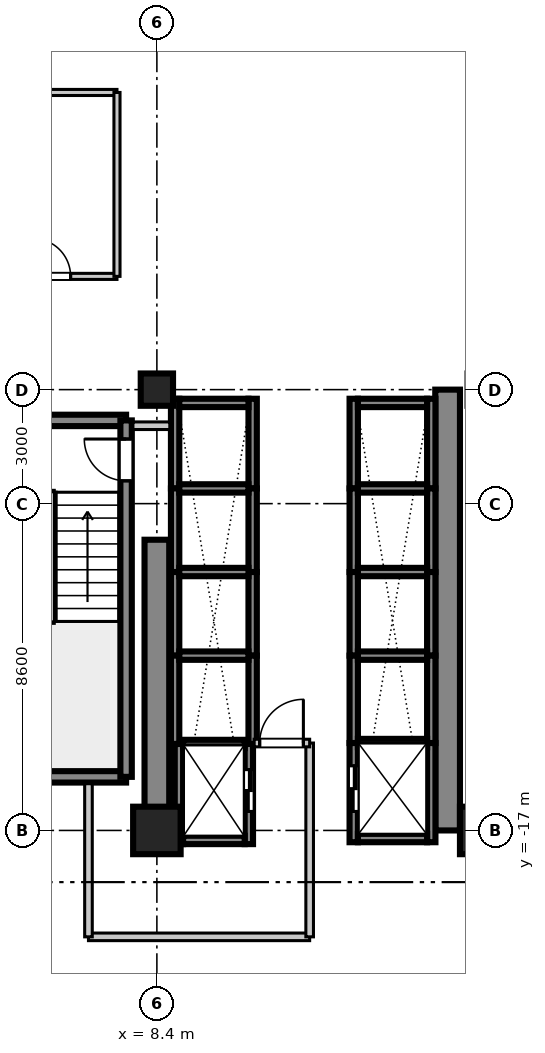
"""IFC4 building model, lengths in metres.
Left out: names, types, materials, properties, quantities, classifications, styles, units other than length and angle.
Written with IfcOpenShell. Run it as: python <this file> out.ifc"""

import sys

from ifc_helpers import new_model, si_unit, direction, frame, frame_2d, origin, origin_2d, place, context, subcontext, project, spatial, rectangle, extrude, source, transform, mapped, element, fill, save


model = new_model("IFC4")
c1 = context("Model", 3, precision=1e-05, world=origin(), true_north=direction((0.0, 1.0)))
c2 = subcontext(c1, "Body", "Model", "MODEL_VIEW")
j1 = project(units=[si_unit("LENGTHUNIT", "METRE"), si_unit("PLANEANGLEUNIT", "RADIAN")], contexts=[c1])
p1 = place(None, origin())
s1 = spatial("IfcSite", under=j1, at=p1, CompositionType="ELEMENT")
p2 = place(p1, origin())
s2 = spatial("IfcBuilding", under=s1, at=p2, CompositionType="ELEMENT")
p3 = place(p2, frame((0.0, 0.0, 124.8)))
s3 = spatial("IfcBuildingStorey", under=s2, at=p3, CompositionType="ELEMENT", Elevation=124.8)
m1 = source(origin(), c2, "Body", "SweptSolid", [
    extrude(rectangle(XDim=1.25, YDim=1.25, at=origin_2d()), origin(), (0.0, 0.0, 1.0), 3.605),
])
p4 = place(p3, frame((8.4, -17.0, 0.0), z_axis=(0.0, 0.0, 1.0), x_axis=(1.0, 0.0, 0.0)))
e1 = element("IfcColumn", 1, at=p4, inside=s3, PredefinedType="COLUMN", context=c2, shape_type="MappedRepresentation", body=[
    mapped(m1, transform((0.0, 0.0, 0.0), scale=1.0)),
])
m2 = source(origin(), c2, "Body", "SweptSolid", [
    extrude(rectangle(XDim=0.85, YDim=0.85, at=origin_2d()), origin(), (0.0, 0.0, 1.0), 3.605),
])
p5 = place(p3, frame((8.4, -5.4, 0.0), z_axis=(0.0, 0.0, 1.0), x_axis=(1.0, 0.0, 0.0)))
e2 = element("IfcColumn", 2, at=p5, inside=s3, PredefinedType="PILASTER", context=c2, shape_type="MappedRepresentation", body=[
    mapped(m2, transform((0.0, 0.0, 0.0), scale=1.0)),
])
p6 = place(p3, frame((17.0, -17.0, 0.0), z_axis=(0.0, 0.0, 1.0), x_axis=(1.0, 0.0, 0.0)))
e3 = element("IfcColumn", 3, at=p6, inside=s3, PredefinedType="COLUMN", context=c2, shape_type="MappedRepresentation", body=[
    mapped(m1, transform((0.0, 0.0, 0.0), scale=1.0)),
])
m3 = source(origin(), c2, "Body", "SweptSolid", [
    extrude(rectangle(XDim=7.65, YDim=0.65, at=frame_2d((3.825, 0.0))), origin(), (0.0, 0.0, 1.0), 3.38),
])
p7 = place(p3, frame((8.4, -17.0, 0.0), z_axis=(0.0, 0.0, 1.0), x_axis=(0.0, 1.0, 0.0)))
e4 = element("IfcWall", 4, at=p7, inside=s3, PredefinedType="SHEAR", context=c2, shape_type="MappedRepresentation", body=[
    mapped(m3, transform((0.0, 0.0, 0.0), scale=1.0)),
])
m4 = source(origin(), c2, "Body", "SweptSolid", [
    extrude(rectangle(XDim=11.6, YDim=0.65, at=frame_2d((5.8, 0.0))), origin(), (0.0, 0.0, 1.0), 3.38),
])
p8 = place(p3, frame((16.05, -17.0, 0.0), z_axis=(0.0, 0.0, 1.0), x_axis=(0.0, 1.0, 0.0)))
e5 = element("IfcWall", 5, at=p8, inside=s3, PredefinedType="SHEAR", context=c2, shape_type="MappedRepresentation", body=[
    mapped(m4, transform((0.0, 0.0, 0.0), scale=1.0)),
])
m5 = source(origin(), c2, "Body", "SweptSolid", [
    extrude(rectangle(XDim=3.98, YDim=0.3, at=frame_2d((1.99, 0.0))), origin(), (0.0, 0.0, 1.0), 3.38),
])
for number, where, z_axis, x_axis in (
    (6, (3.61, -15.59, 0.0), (0.0, 0.0, 1.0), (1.0, 0.0, 0.0)),
    (7, (3.61, -6.21, 0.0), (0.0, 0.0, 1.0), (1.0, 0.0, 0.0)),
):
    element("IfcWall", number, at=place(p3, frame(where, z_axis=z_axis, x_axis=x_axis)), inside=s3, PredefinedType="SHEAR", context=c2, shape_type="MappedRepresentation", body=[
        mapped(m5, transform((0.0, 0.0, 0.0), scale=1.0)),
    ])
m6 = source(origin(), c2, "Body", "SweptSolid", [
    extrude(rectangle(XDim=9.38, YDim=0.3, at=frame_2d((4.69, 0.0))), origin(), (0.0, 0.0, 1.0), 3.38),
])
p9 = place(p3, frame((7.59, -15.59, 0.0), z_axis=(0.0, 0.0, 1.0), x_axis=(0.0, 1.0, 0.0)))
e8 = element("IfcWall", 8, at=p9, inside=s3, PredefinedType="SHEAR", context=c2, shape_type="MappedRepresentation", body=[
    mapped(m6, transform((0.0, 0.0, 0.0), scale=1.0)),
])
p10 = place(p9, frame((7.79, 0.0, 0.0)))
e9 = element("IfcOpeningElement", 9, at=p10, cuts=e8, PredefinedType="OPENING", context=c2, shape_type="SweptSolid", body=[
    extrude(rectangle(XDim=1.1, YDim=2.15, at=frame_2d((0.55, 1.075))), frame((0.0, 0.16, 0.0), z_axis=(0.0, -1.0, 0.0), x_axis=(1.0, 0.0, 0.0)), (0.0, 0.0, 1.0), 0.32),
])
m7 = source(origin(), c2, "Body", "SweptSolid", [
    extrude(rectangle(XDim=2.36, YDim=0.22, at=frame_2d((1.18, 0.0))), origin(), (0.0, 0.0, 1.0), 3.38),
])
for number, where, z_axis, x_axis in (
    (10, (13.58, -8.0, 0.0), (0.0, 0.0, 1.0), (0.0, 1.0, 0.0)),
    (11, (15.62, -8.0, 0.0), (0.0, 0.0, 1.0), (0.0, 1.0, 0.0)),
):
    element("IfcWall", number, at=place(p3, frame(where, z_axis=z_axis, x_axis=x_axis)), inside=s3, PredefinedType="SHEAR", context=c2, shape_type="MappedRepresentation", body=[
        mapped(m7, transform((0.0, 0.0, 0.0), scale=1.0)),
    ])
m8 = source(origin(), c2, "Body", "SweptSolid", [
    extrude(rectangle(XDim=1.82, YDim=0.22, at=frame_2d((0.91, 0.0))), origin(), (0.0, 0.0, 1.0), 3.38),
])
p11 = place(p3, frame((13.69, -5.75, 0.0), z_axis=(0.0, 0.0, 1.0), x_axis=(1.0, 0.0, 0.0)))
e12 = element("IfcWall", 12, at=p11, inside=s3, PredefinedType="SHEAR", context=c2, shape_type="MappedRepresentation", body=[
    mapped(m8, transform((0.0, 0.0, 0.0), scale=1.0)),
])
m9 = source(origin(), c2, "Body", "SweptSolid", [
    extrude(rectangle(XDim=2.2, YDim=0.22, at=frame_2d((1.1, 0.0))), origin(), (0.0, 0.0, 1.0), 3.38),
])
for number, where, z_axis, x_axis in (
    (13, (13.58, -10.2, 0.0), (0.0, 0.0, 1.0), (0.0, 1.0, 0.0)),
    (14, (15.62, -10.2, 0.0), (0.0, 0.0, 1.0), (0.0, 1.0, 0.0)),
):
    element("IfcWall", number, at=place(p3, frame(where, z_axis=z_axis, x_axis=x_axis)), inside=s3, PredefinedType="SHEAR", context=c2, shape_type="MappedRepresentation", body=[
        mapped(m9, transform((0.0, 0.0, 0.0), scale=1.0)),
    ])
m10 = source(origin(), c2, "Body", "SweptSolid", [
    extrude(rectangle(XDim=1.82, YDim=0.22, at=frame_2d((0.91, 0.0))), origin(), (0.0, 0.0, 1.0), 3.65),
])
p12 = place(p3, frame((13.69, -8.0, 0.0), z_axis=(0.0, 0.0, 1.0), x_axis=(1.0, 0.0, 0.0)))
e15 = element("IfcWall", 15, at=p12, inside=s3, PredefinedType="SHEAR", context=c2, shape_type="MappedRepresentation", body=[
    mapped(m10, transform((0.0, 0.0, 0.0), scale=1.0)),
])
for number, where, z_axis, x_axis in (
    (16, (13.58, -12.4, 0.0), (0.0, 0.0, 1.0), (0.0, 1.0, 0.0)),
    (17, (15.62, -12.4, 0.0), (0.0, 0.0, 1.0), (0.0, 1.0, 0.0)),
):
    element("IfcWall", number, at=place(p3, frame(where, z_axis=z_axis, x_axis=x_axis)), inside=s3, PredefinedType="SHEAR", context=c2, shape_type="MappedRepresentation", body=[
        mapped(m9, transform((0.0, 0.0, 0.0), scale=1.0)),
    ])
p13 = place(p3, frame((13.69, -10.2, 0.0), z_axis=(0.0, 0.0, 1.0), x_axis=(1.0, 0.0, 0.0)))
e18 = element("IfcWall", 18, at=p13, inside=s3, PredefinedType="SHEAR", context=c2, shape_type="MappedRepresentation", body=[
    mapped(m10, transform((0.0, 0.0, 0.0), scale=1.0)),
])
m11 = source(origin(), c2, "Body", "SweptSolid", [
    extrude(rectangle(XDim=2.3, YDim=0.22, at=frame_2d((1.15, 0.0))), origin(), (0.0, 0.0, 1.0), 3.38),
])
for number, where, z_axis, x_axis in (
    (19, (13.58, -14.7, 0.0), (0.0, 0.0, 1.0), (0.0, 1.0, 0.0)),
    (20, (15.62, -14.7, 0.0), (0.0, 0.0, 1.0), (0.0, 1.0, 0.0)),
):
    element("IfcWall", number, at=place(p3, frame(where, z_axis=z_axis, x_axis=x_axis)), inside=s3, PredefinedType="SHEAR", context=c2, shape_type="MappedRepresentation", body=[
        mapped(m11, transform((0.0, 0.0, 0.0), scale=1.0)),
    ])
p14 = place(p3, frame((13.69, -12.4, 0.0), z_axis=(0.0, 0.0, 1.0), x_axis=(1.0, 0.0, 0.0)))
e21 = element("IfcWall", 21, at=p14, inside=s3, PredefinedType="SHEAR", context=c2, shape_type="MappedRepresentation", body=[
    mapped(m10, transform((0.0, 0.0, 0.0), scale=1.0)),
])
for number, where, z_axis, x_axis in (
    (22, (8.88, -8.0, 0.0), (0.0, 0.0, 1.0), (0.0, 1.0, 0.0)),
    (23, (10.92, -8.0, 0.0), (0.0, 0.0, 1.0), (0.0, 1.0, 0.0)),
):
    element("IfcWall", number, at=place(p3, frame(where, z_axis=z_axis, x_axis=x_axis)), inside=s3, PredefinedType="SHEAR", context=c2, shape_type="MappedRepresentation", body=[
        mapped(m7, transform((0.0, 0.0, 0.0), scale=1.0)),
    ])
p15 = place(p3, frame((8.99, -5.75, 0.0), z_axis=(0.0, 0.0, 1.0), x_axis=(1.0, 0.0, 0.0)))
e24 = element("IfcWall", 24, at=p15, inside=s3, PredefinedType="SHEAR", context=c2, shape_type="MappedRepresentation", body=[
    mapped(m8, transform((0.0, 0.0, 0.0), scale=1.0)),
])
for number, where, z_axis, x_axis in (
    (25, (8.88, -10.2, 0.0), (0.0, 0.0, 1.0), (0.0, 1.0, 0.0)),
    (26, (10.92, -10.2, 0.0), (0.0, 0.0, 1.0), (0.0, 1.0, 0.0)),
):
    element("IfcWall", number, at=place(p3, frame(where, z_axis=z_axis, x_axis=x_axis)), inside=s3, PredefinedType="SHEAR", context=c2, shape_type="MappedRepresentation", body=[
        mapped(m9, transform((0.0, 0.0, 0.0), scale=1.0)),
    ])
p16 = place(p3, frame((8.99, -8.0, 0.0), z_axis=(0.0, 0.0, 1.0), x_axis=(1.0, 0.0, 0.0)))
e27 = element("IfcWall", 27, at=p16, inside=s3, PredefinedType="SHEAR", context=c2, shape_type="MappedRepresentation", body=[
    mapped(m10, transform((0.0, 0.0, 0.0), scale=1.0)),
])
for number, where, z_axis, x_axis in (
    (28, (8.88, -12.4, 0.0), (0.0, 0.0, 1.0), (0.0, 1.0, 0.0)),
    (29, (10.92, -12.4, 0.0), (0.0, 0.0, 1.0), (0.0, 1.0, 0.0)),
):
    element("IfcWall", number, at=place(p3, frame(where, z_axis=z_axis, x_axis=x_axis)), inside=s3, PredefinedType="SHEAR", context=c2, shape_type="MappedRepresentation", body=[
        mapped(m9, transform((0.0, 0.0, 0.0), scale=1.0)),
    ])
p17 = place(p3, frame((8.99, -10.2, 0.0), z_axis=(0.0, 0.0, 1.0), x_axis=(1.0, 0.0, 0.0)))
e30 = element("IfcWall", 30, at=p17, inside=s3, PredefinedType="SHEAR", context=c2, shape_type="MappedRepresentation", body=[
    mapped(m10, transform((0.0, 0.0, 0.0), scale=1.0)),
])
m12 = source(origin(), c2, "Body", "SweptSolid", [
    extrude(rectangle(XDim=2.325, YDim=0.22, at=frame_2d((1.163, 0.0))), origin(), (0.0, 0.0, 1.0), 3.38),
])
for number, where, z_axis, x_axis in (
    (31, (8.88, -14.725, 0.0), (0.0, 0.0, 1.0), (0.0, 1.0, 0.0)),
    (32, (10.92, -14.725, 0.0), (0.0, 0.0, 1.0), (0.0, 1.0, 0.0)),
):
    element("IfcWall", number, at=place(p3, frame(where, z_axis=z_axis, x_axis=x_axis)), inside=s3, PredefinedType="SHEAR", context=c2, shape_type="MappedRepresentation", body=[
        mapped(m12, transform((0.0, 0.0, 0.0), scale=1.0)),
    ])
p18 = place(p3, frame((8.99, -12.4, 0.0), z_axis=(0.0, 0.0, 1.0), x_axis=(1.0, 0.0, 0.0)))
e33 = element("IfcWall", 33, at=p18, inside=s3, PredefinedType="SHEAR", context=c2, shape_type="MappedRepresentation", body=[
    mapped(m10, transform((0.0, 0.0, 0.0), scale=1.0)),
])
m13 = source(origin(), c2, "Body", "SweptSolid", [
    extrude(rectangle(XDim=2.635, YDim=0.22, at=frame_2d((1.317, 0.0))), origin(), (0.0, 0.0, 1.0), 3.38),
])
p19 = place(p3, frame((8.98, -17.36, 0.0), z_axis=(0.0, 0.0, 1.0), x_axis=(0.0, 1.0, 0.0)))
e34 = element("IfcWall", 34, at=p19, inside=s3, PredefinedType="SHEAR", context=c2, shape_type="MappedRepresentation", body=[
    mapped(m13, transform((0.0, 0.0, 0.0), scale=1.0)),
])
p20 = place(p3, frame((10.82, -17.36, 0.0), z_axis=(0.0, 0.0, 1.0), x_axis=(0.0, 1.0, 0.0)))
e35 = element("IfcWall", 35, at=p20, inside=s3, PredefinedType="SHEAR", context=c2, shape_type="MappedRepresentation", body=[
    mapped(m13, transform((0.0, 0.0, 0.0), scale=1.0)),
])
p21 = place(p20, frame((0.86, 0.0, 0.0)))
e36 = element("IfcOpeningElement", 36, at=p21, cuts=e35, PredefinedType="OPENING", context=c2, shape_type="SweptSolid", body=[
    extrude(rectangle(XDim=1.1, YDim=2.2, at=frame_2d((0.55, 1.1))), frame((0.0, 0.12, 0.0), z_axis=(0.0, -1.0, 0.0), x_axis=(1.0, 0.0, 0.0)), (0.0, 0.0, 1.0), 0.24),
])
m14 = source(origin(), c2, "Body", "SweptSolid", [
    extrude(rectangle(XDim=1.62, YDim=0.22, at=frame_2d((0.81, 0.0))), origin(), (0.0, 0.0, 1.0), 3.38),
])
p22 = place(p3, frame((9.09, -17.25, 0.0), z_axis=(0.0, 0.0, 1.0), x_axis=(1.0, 0.0, 0.0)))
e37 = element("IfcWall", 37, at=p22, inside=s3, PredefinedType="SHEAR", context=c2, shape_type="MappedRepresentation", body=[
    mapped(m14, transform((0.0, 0.0, 0.0), scale=1.0)),
])
m15 = source(origin(), c2, "Body", "SweptSolid", [
    extrude(rectangle(XDim=1.62, YDim=0.22, at=frame_2d((0.81, 0.0))), origin(), (0.0, 0.0, 1.0), 3.65),
])
p23 = place(p3, frame((9.09, -14.725, 0.0), z_axis=(0.0, 0.0, 1.0), x_axis=(1.0, 0.0, 0.0)))
e38 = element("IfcWall", 38, at=p23, inside=s3, PredefinedType="SHEAR", context=c2, shape_type="MappedRepresentation", body=[
    mapped(m15, transform((0.0, 0.0, 0.0), scale=1.0)),
])
m16 = source(origin(), c2, "Body", "SweptSolid", [
    extrude(rectangle(XDim=2.61, YDim=0.22, at=frame_2d((1.305, 0.0))), origin(), (0.0, 0.0, 1.0), 3.38),
])
p24 = place(p3, frame((13.58, -17.31, 0.0), z_axis=(0.0, 0.0, 1.0), x_axis=(0.0, 1.0, 0.0)))
e39 = element("IfcWall", 39, at=p24, inside=s3, PredefinedType="SHEAR", context=c2, shape_type="MappedRepresentation", body=[
    mapped(m16, transform((0.0, 0.0, 0.0), scale=1.0)),
])
p25 = place(p24, frame((0.81, 0.0, 0.0)))
e40 = element("IfcOpeningElement", 40, at=p25, cuts=e39, PredefinedType="OPENING", context=c2, shape_type="SweptSolid", body=[
    extrude(rectangle(XDim=1.2, YDim=2.2, at=frame_2d((0.6, 1.1))), frame((0.0, 0.12, 0.0), z_axis=(0.0, -1.0, 0.0), x_axis=(1.0, 0.0, 0.0)), (0.0, 0.0, 1.0), 0.24),
])
p26 = place(p3, frame((15.62, -17.31, 0.0), z_axis=(0.0, 0.0, 1.0), x_axis=(0.0, 1.0, 0.0)))
e41 = element("IfcWall", 41, at=p26, inside=s3, PredefinedType="SHEAR", context=c2, shape_type="MappedRepresentation", body=[
    mapped(m16, transform((0.0, 0.0, 0.0), scale=1.0)),
])
p27 = place(p3, frame((13.69, -17.2, 0.0), z_axis=(0.0, 0.0, 1.0), x_axis=(1.0, 0.0, 0.0)))
e42 = element("IfcWall", 42, at=p27, inside=s3, PredefinedType="SHEAR", context=c2, shape_type="MappedRepresentation", body=[
    mapped(m8, transform((0.0, 0.0, 0.0), scale=1.0)),
])
p28 = place(p3, frame((13.69, -14.7, 0.0), z_axis=(0.0, 0.0, 1.0), x_axis=(1.0, 0.0, 0.0)))
e43 = element("IfcWall", 43, at=p28, inside=s3, PredefinedType="SHEAR", context=c2, shape_type="MappedRepresentation", body=[
    mapped(m10, transform((0.0, 0.0, 0.0), scale=1.0)),
])
m17 = source(origin(), c2, "Body", "SweptSolid", [
    extrude(rectangle(XDim=5.82, YDim=0.2, at=frame_2d((2.91, 0.0))), origin(), (0.0, 0.0, 1.0), 2.72),
])
p29 = place(p3, frame((6.6, -19.8, 0.0), z_axis=(0.0, 0.0, 1.0), x_axis=(1.0, 0.0, 0.0)))
e44 = element("IfcWall", 44, at=p29, inside=s3, PredefinedType="PARTITIONING", context=c2, shape_type="MappedRepresentation", body=[
    mapped(m17, transform((0.0, 0.0, 0.0), scale=1.0)),
])
m18 = source(origin(), c2, "Body", "SweptSolid", [
    extrude(rectangle(XDim=4.03, YDim=0.2, at=frame_2d((2.015, 0.0))), origin(), (0.0, 0.0, 1.0), 2.72),
])
p30 = place(p3, frame((6.6, -19.8, 0.0), z_axis=(0.0, 0.0, 1.0), x_axis=(0.0, 1.0, 0.0)))
e45 = element("IfcWall", 45, at=p30, inside=s3, PredefinedType="PARTITIONING", context=c2, shape_type="MappedRepresentation", body=[
    mapped(m18, transform((0.0, 0.0, 0.0), scale=1.0)),
])
m19 = source(origin(), c2, "Body", "SweptSolid", [
    extrude(rectangle(XDim=5.1, YDim=0.2, at=frame_2d((2.55, 0.0))), origin(), (0.0, 0.0, 1.0), 2.72),
])
p31 = place(p3, frame((12.42, -19.8, 0.0), z_axis=(0.0, 0.0, 1.0), x_axis=(0.0, 1.0, 0.0)))
e46 = element("IfcWall", 46, at=p31, inside=s3, PredefinedType="PARTITIONING", context=c2, shape_type="MappedRepresentation", body=[
    mapped(m19, transform((0.0, 0.0, 0.0), scale=1.0)),
])
m20 = source(origin(), c2, "Body", "SweptSolid", [
    extrude(rectangle(XDim=1.46, YDim=0.2, at=frame_2d((0.73, 0.0))), origin(), (0.0, 0.0, 1.0), 2.72),
])
p32 = place(p3, frame((10.96, -14.7, 0.0), z_axis=(0.0, 0.0, 1.0), x_axis=(1.0, 0.0, 0.0)))
e47 = element("IfcWall", 47, at=p32, inside=s3, PredefinedType="PARTITIONING", context=c2, shape_type="MappedRepresentation", body=[
    mapped(m20, transform((0.0, 0.0, 0.0), scale=1.0)),
])
p33 = place(p32, frame((0.145, 0.0, 0.0)))
e48 = element("IfcOpeningElement", 48, at=p33, cuts=e47, PredefinedType="OPENING", context=c2, shape_type="SweptSolid", body=[
    extrude(rectangle(XDim=1.15, YDim=2.15, at=frame_2d((0.575, 1.075))), frame((0.0, 0.11, 0.0), z_axis=(0.0, -1.0, 0.0), x_axis=(1.0, 0.0, 0.0)), (0.0, 0.0, 1.0), 0.22),
])
m21 = source(origin(), c2, "Body", "SweptSolid", [
    extrude(rectangle(XDim=0.97, YDim=0.2, at=frame_2d((0.485, 0.0))), origin(), (0.0, 0.0, 1.0), 2.72),
])
p34 = place(p3, frame((7.77, -6.35, 0.0), z_axis=(0.0, 0.0, 1.0), x_axis=(1.0, 0.0, 0.0)))
e49 = element("IfcWall", 49, at=p34, inside=s3, PredefinedType="PARTITIONING", context=c2, shape_type="MappedRepresentation", body=[
    mapped(m21, transform((0.0, 0.0, 0.0), scale=1.0)),
])
m22 = source(origin(), c2, "Body", "SweptSolid", [
    extrude(rectangle(XDim=3.6, YDim=0.16, at=frame_2d((1.8, 0.0))), origin(), (0.0, 0.0, 1.0), 2.72),
])
p35 = place(p3, frame((3.75, -2.42, 0.0), z_axis=(0.0, 0.0, 1.0), x_axis=(1.0, 0.0, 0.0)))
e50 = element("IfcWall", 50, at=p35, inside=s3, PredefinedType="PARTITIONING", context=c2, shape_type="MappedRepresentation", body=[
    mapped(m22, transform((0.0, 0.0, 0.0), scale=1.0)),
])
p36 = place(p35, frame((1.38, 0.0, 0.0)))
e51 = element("IfcOpeningElement", 51, at=p36, cuts=e50, PredefinedType="OPENING", context=c2, shape_type="SweptSolid", body=[
    extrude(rectangle(XDim=1.0, YDim=2.1, at=frame_2d((0.5, 1.05))), frame((0.0, 0.09, 0.0), z_axis=(0.0, -1.0, 0.0), x_axis=(1.0, 0.0, 0.0)), (0.0, 0.0, 1.0), 0.18),
])
p37 = place(p3, frame((3.75, 2.42, 0.0), z_axis=(0.0, 0.0, 1.0), x_axis=(1.0, 0.0, 0.0)))
e52 = element("IfcWall", 52, at=p37, inside=s3, PredefinedType="PARTITIONING", context=c2, shape_type="MappedRepresentation", body=[
    mapped(m22, transform((0.0, 0.0, 0.0), scale=1.0)),
])
m23 = source(origin(), c2, "Body", "SweptSolid", [
    extrude(rectangle(XDim=4.84, YDim=0.16, at=frame_2d((2.42, 0.0))), origin(), (0.0, 0.0, 1.0), 2.72),
])
p38 = place(p3, frame((7.35, -2.42, 0.0), z_axis=(0.0, 0.0, 1.0), x_axis=(0.0, 1.0, 0.0)))
e53 = element("IfcWall", 53, at=p38, inside=s3, PredefinedType="PARTITIONING", context=c2, shape_type="MappedRepresentation", body=[
    mapped(m23, transform((0.0, 0.0, 0.0), scale=1.0)),
])
m24 = source(origin(), c2, "Body", "SweptSolid", [
    extrude(rectangle(XDim=1.1, YDim=2.15, at=frame_2d((0.55, 1.075))), frame((0.0, 0.025, 0.0), z_axis=(0.0, -1.0, 0.0), x_axis=(1.0, 0.0, 0.0)), (0.0, 0.0, 1.0), 0.05),
])
p39 = place(p10, origin())
e54 = element("IfcDoor", 54, at=p39, inside=s3, OperationType="SINGLE_SWING_RIGHT", PredefinedType="DOOR", context=c2, shape_type="MappedRepresentation", body=[
    mapped(m24, transform((0.0, 0.0, 0.0), scale=1.0)),
])
fill(e9, e54)
m25 = source(origin(), c2, "Body", "SweptSolid", [
    extrude(rectangle(XDim=1.1, YDim=2.2, at=frame_2d((0.55, 1.1))), frame((0.0, 0.025, 0.0), z_axis=(0.0, -1.0, 0.0), x_axis=(1.0, 0.0, 0.0)), (0.0, 0.0, 1.0), 0.05),
])
p40 = place(p21, frame((1.1, 0.0, 0.0), z_axis=(0.0, 0.0, 1.0), x_axis=(-1.0, 0.0, 0.0)))
e55 = element("IfcDoor", 55, at=p40, inside=s3, OperationType="DOUBLE_DOOR_SLIDING", PredefinedType="DOOR", context=c2, shape_type="MappedRepresentation", body=[
    mapped(m25, transform((0.0, 0.0, 0.0), scale=1.0)),
])
fill(e36, e55)
m26 = source(origin(), c2, "Body", "SweptSolid", [
    extrude(rectangle(XDim=1.2, YDim=2.2, at=frame_2d((0.6, 1.1))), frame((0.0, 0.025, 0.0), z_axis=(0.0, -1.0, 0.0), x_axis=(1.0, 0.0, 0.0)), (0.0, 0.0, 1.0), 0.05),
])
p41 = place(p25, origin())
e56 = element("IfcDoor", 56, at=p41, inside=s3, OperationType="DOUBLE_DOOR_SLIDING", PredefinedType="DOOR", context=c2, shape_type="MappedRepresentation", body=[
    mapped(m26, transform((0.0, 0.0, 0.0), scale=1.0)),
])
fill(e40, e56)
m27 = source(origin(), c2, "Body", "SweptSolid", [
    extrude(rectangle(XDim=1.15, YDim=2.15, at=frame_2d((0.575, 1.075))), frame((0.0, 0.025, 0.0), z_axis=(0.0, -1.0, 0.0), x_axis=(1.0, 0.0, 0.0)), (0.0, 0.0, 1.0), 0.05),
])
p42 = place(p33, origin())
e57 = element("IfcDoor", 57, at=p42, inside=s3, OperationType="SINGLE_SWING_RIGHT", PredefinedType="DOOR", context=c2, shape_type="MappedRepresentation", body=[
    mapped(m27, transform((0.0, 0.0, 0.0), scale=1.0)),
])
fill(e48, e57)
m28 = source(origin(), c2, "Body", "SweptSolid", [
    extrude(rectangle(XDim=1.0, YDim=2.1, at=frame_2d((0.5, 1.05))), frame((0.0, 0.025, 0.0), z_axis=(0.0, -1.0, 0.0), x_axis=(1.0, 0.0, 0.0)), (0.0, 0.0, 1.0), 0.05),
])
p43 = place(p36, origin())
e58 = element("IfcDoor", 58, at=p43, inside=s3, OperationType="SINGLE_SWING_LEFT", PredefinedType="DOOR", context=c2, shape_type="MappedRepresentation", body=[
    mapped(m28, transform((0.0, 0.0, 0.0), scale=1.0)),
])
fill(e51, e58)
save(model, sys.argv[1])
